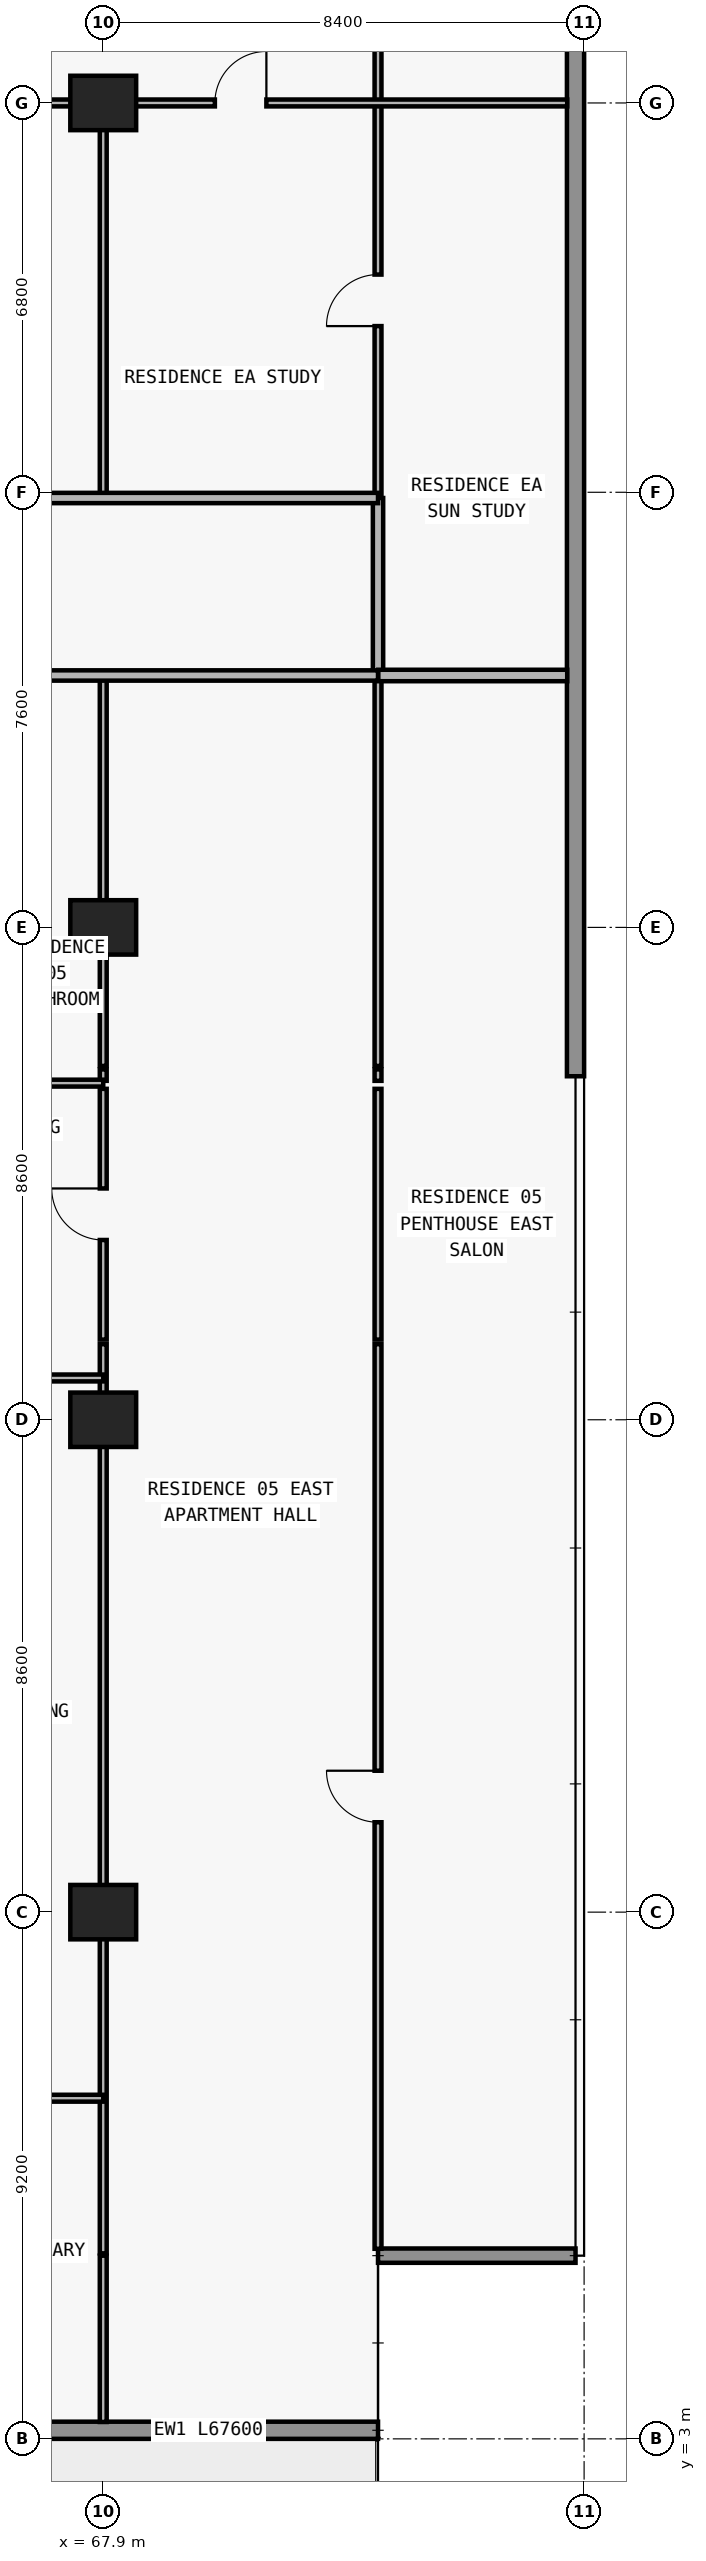
"""IFC4 building model, lengths in metres.
Left out: names, types, materials, properties, quantities, classifications, styles, units other than length and angle.
Written with IfcOpenShell. Run it as: python <this file> out.ifc"""

import sys

from ifc_helpers import new_model, si_unit, direction, frame, frame_2d, origin, origin_2d, place, context, subcontext, project, spatial, rectangle, extrude, element, fill, save


model = new_model("IFC4")
c1 = context("Model", 3, precision=1e-05, world=origin(), true_north=direction((0.0, 1.0)))
c2 = subcontext(c1, "Body", "Model", "MODEL_VIEW")
j1 = project(units=[si_unit("LENGTHUNIT", "METRE"), si_unit("PLANEANGLEUNIT", "RADIAN")], contexts=[c1])
p1 = place(None, origin())
s1 = spatial("IfcSite", under=j1, at=p1, CompositionType="ELEMENT")
p2 = place(p1, origin())
s2 = spatial("IfcBuilding", under=s1, at=p2, CompositionType="ELEMENT")
p3 = place(p2, frame((0.0, 0.0, 59.7)))
s3 = spatial("IfcBuildingStorey", under=s2, at=p3, CompositionType="ELEMENT", Elevation=59.7)
for number, where, z_axis, x_axis in (
    (1, (67.9, 12.2, 0.0), (0.0, 0.0, 1.0), (1.0, 0.0, 0.0)),
    (2, (67.9, 20.8, 0.0), (0.0, 0.0, 1.0), (1.0, 0.0, 0.0)),
    (3, (67.9, 29.4, 0.0), (0.0, 0.0, 1.0), (1.0, 0.0, 0.0)),
    (4, (67.9, 43.8, 0.0), (0.0, 0.0, 1.0), (1.0, 0.0, 0.0)),
):
    element("IfcColumn", number, at=place(p3, frame(where, z_axis=z_axis, x_axis=x_axis)), inside=s3, PredefinedType="COLUMN", context=c2, shape_type="SweptSolid", body=[
        extrude(rectangle(XDim=1.15, YDim=0.95, at=origin_2d()), origin(), (0.0, 0.0, 1.0), 3.05),
    ])
p4 = place(p3, frame((72.7, 3.15, 0.0), z_axis=(0.0, 0.0, 1.0), x_axis=(-1.0, 0.0, 0.0)))
e5 = element("IfcWall", 5, at=p4, inside=s3, PredefinedType="STANDARD", context=c2, shape_type="SweptSolid", body=[
    extrude(rectangle(XDim=67.6, YDim=0.3, at=frame_2d((33.8, 0.0))), origin(), (0.0, 0.0, 1.0), 3.05),
])
p5 = place(p4, frame((59.89, 0.0, 0.0)))
e6 = element("IfcOpeningElement", 6, at=p5, cuts=e5, PredefinedType="OPENING", context=c2, shape_type="SweptSolid", body=[
    extrude(rectangle(XDim=2.0, YDim=2.3, at=frame_2d((1.0, 1.15))), frame((0.0, 0.16, 0.0), z_axis=(0.0, -1.0, 0.0), x_axis=(1.0, 0.0, 0.0)), (0.0, 0.0, 1.0), 0.32),
])
p6 = place(p4, frame((55.21, 0.0, 0.65)))
e7 = element("IfcOpeningElement", 7, at=p6, cuts=e5, PredefinedType="OPENING", context=c2, shape_type="SweptSolid", body=[
    extrude(rectangle(XDim=2.6, YDim=1.85, at=frame_2d((1.3, 0.925))), frame((0.0, 0.16, 0.0), z_axis=(0.0, -1.0, 0.0), x_axis=(1.0, 0.0, 0.0)), (0.0, 0.0, 1.0), 0.32),
])
p7 = place(p4, frame((49.1, 0.0, 0.85)))
e8 = element("IfcOpeningElement", 8, at=p7, cuts=e5, PredefinedType="OPENING", context=c2, shape_type="SweptSolid", body=[
    extrude(rectangle(XDim=2.2, YDim=1.55, at=frame_2d((1.1, 0.775))), frame((0.0, 0.16, 0.0), z_axis=(0.0, -1.0, 0.0), x_axis=(1.0, 0.0, 0.0)), (0.0, 0.0, 1.0), 0.32),
])
p8 = place(p4, frame((43.09, 0.0, 0.0)))
e9 = element("IfcOpeningElement", 9, at=p8, cuts=e5, PredefinedType="OPENING", context=c2, shape_type="SweptSolid", body=[
    extrude(rectangle(XDim=2.0, YDim=2.3, at=frame_2d((1.0, 1.15))), frame((0.0, 0.16, 0.0), z_axis=(0.0, -1.0, 0.0), x_axis=(1.0, 0.0, 0.0)), (0.0, 0.0, 1.0), 0.32),
])
p9 = place(p4, frame((38.41, 0.0, 0.65)))
e10 = element("IfcOpeningElement", 10, at=p9, cuts=e5, PredefinedType="OPENING", context=c2, shape_type="SweptSolid", body=[
    extrude(rectangle(XDim=2.6, YDim=1.85, at=frame_2d((1.3, 0.925))), frame((0.0, 0.16, 0.0), z_axis=(0.0, -1.0, 0.0), x_axis=(1.0, 0.0, 0.0)), (0.0, 0.0, 1.0), 0.32),
])
p10 = place(p4, frame((32.7, 0.0, 0.85)))
e11 = element("IfcOpeningElement", 11, at=p10, cuts=e5, PredefinedType="OPENING", context=c2, shape_type="SweptSolid", body=[
    extrude(rectangle(XDim=2.2, YDim=1.55, at=frame_2d((1.1, 0.775))), frame((0.0, 0.16, 0.0), z_axis=(0.0, -1.0, 0.0), x_axis=(1.0, 0.0, 0.0)), (0.0, 0.0, 1.0), 0.32),
])
p11 = place(p4, frame((27.026, 0.0, 0.0)))
e12 = element("IfcOpeningElement", 12, at=p11, cuts=e5, PredefinedType="OPENING", context=c2, shape_type="SweptSolid", body=[
    extrude(rectangle(XDim=2.0, YDim=2.3, at=frame_2d((1.0, 1.15))), frame((0.0, 0.16, 0.0), z_axis=(0.0, -1.0, 0.0), x_axis=(1.0, 0.0, 0.0)), (0.0, 0.0, 1.0), 0.32),
])
p12 = place(p4, frame((22.726, 0.0, 0.85)))
e13 = element("IfcOpeningElement", 13, at=p12, cuts=e5, PredefinedType="OPENING", context=c2, shape_type="SweptSolid", body=[
    extrude(rectangle(XDim=2.2, YDim=1.55, at=frame_2d((1.1, 0.775))), frame((0.0, 0.16, 0.0), z_axis=(0.0, -1.0, 0.0), x_axis=(1.0, 0.0, 0.0)), (0.0, 0.0, 1.0), 0.32),
])
p13 = place(p4, frame((18.29, 0.0, 0.0)))
e14 = element("IfcOpeningElement", 14, at=p13, cuts=e5, PredefinedType="OPENING", context=c2, shape_type="SweptSolid", body=[
    extrude(rectangle(XDim=2.0, YDim=2.3, at=frame_2d((1.0, 1.15))), frame((0.0, 0.16, 0.0), z_axis=(0.0, -1.0, 0.0), x_axis=(1.0, 0.0, 0.0)), (0.0, 0.0, 1.0), 0.32),
])
p14 = place(p4, frame((14.19, 0.0, 0.85)))
e15 = element("IfcOpeningElement", 15, at=p14, cuts=e5, PredefinedType="OPENING", context=c2, shape_type="SweptSolid", body=[
    extrude(rectangle(XDim=1.8, YDim=1.55, at=frame_2d((0.9, 0.775))), frame((0.0, 0.16, 0.0), z_axis=(0.0, -1.0, 0.0), x_axis=(1.0, 0.0, 0.0)), (0.0, 0.0, 1.0), 0.32),
])
p15 = place(p4, frame((10.226, 0.0, 0.0)))
e16 = element("IfcOpeningElement", 16, at=p15, cuts=e5, PredefinedType="OPENING", context=c2, shape_type="SweptSolid", body=[
    extrude(rectangle(XDim=2.0, YDim=2.3, at=frame_2d((1.0, 1.15))), frame((0.0, 0.16, 0.0), z_axis=(0.0, -1.0, 0.0), x_axis=(1.0, 0.0, 0.0)), (0.0, 0.0, 1.0), 0.32),
])
p16 = place(p4, frame((5.926, 0.0, 0.85)))
e17 = element("IfcOpeningElement", 17, at=p16, cuts=e5, PredefinedType="OPENING", context=c2, shape_type="SweptSolid", body=[
    extrude(rectangle(XDim=2.2, YDim=1.55, at=frame_2d((1.1, 0.775))), frame((0.0, 0.16, 0.0), z_axis=(0.0, -1.0, 0.0), x_axis=(1.0, 0.0, 0.0)), (0.0, 0.0, 1.0), 0.32),
])
p17 = place(p3, frame((72.7, 6.2, 0.0), z_axis=(0.0, 0.0, 1.0), x_axis=(1.0, 0.0, 0.0)))
e18 = element("IfcWall", 18, at=p17, inside=s3, PredefinedType="ELEMENTEDWALL", context=c2, shape_type="SweptSolid", body=[
    extrude(rectangle(XDim=3.45, YDim=0.25, at=frame_2d((1.725, 0.0))), origin(), (0.0, 0.0, 1.0), 3.05),
])
p18 = place(p3, frame((76.15, 47.4, 0.0), z_axis=(0.0, 0.0, 1.0), x_axis=(0.0, -1.0, 0.0)))
e19 = element("IfcWall", 19, at=p18, inside=s3, PredefinedType="STANDARD", context=c2, shape_type="SweptSolid", body=[
    extrude(rectangle(XDim=20.6, YDim=0.3, at=frame_2d((10.3, 0.0))), origin(), (0.0, 0.0, 1.0), 3.05),
])
p19 = place(p3, frame((67.9, 3.295, 0.0), z_axis=(0.0, 0.0, 1.0), x_axis=(0.0, 1.0, 0.0)))
e20 = element("IfcWall", 20, at=p19, inside=s3, PredefinedType="PARTITIONING", context=c2, shape_type="SweptSolid", body=[
    extrude(rectangle(XDim=2.905, YDim=0.12, at=frame_2d((1.453, 0.0))), origin(), (0.0, 0.0, 1.0), 3.05),
])
p20 = place(p3, frame((67.9, 6.24, 0.0), z_axis=(0.0, 0.0, 1.0), x_axis=(0.0, 1.0, 0.0)))
e21 = element("IfcWall", 21, at=p20, inside=s3, PredefinedType="PARTITIONING", context=c2, shape_type="SweptSolid", body=[
    extrude(rectangle(XDim=15.88, YDim=0.12, at=frame_2d((7.94, 0.0))), origin(), (0.0, 0.0, 1.0), 2.11),
])
p21 = place(p3, frame((67.9, 22.2, 0.0), z_axis=(0.0, 0.0, 1.0), x_axis=(0.0, 1.0, 0.0)))
e22 = element("IfcWall", 22, at=p21, inside=s3, PredefinedType="PARTITIONING", context=c2, shape_type="SweptSolid", body=[
    extrude(rectangle(XDim=4.38, YDim=0.12, at=frame_2d((2.19, 0.0))), origin(), (0.0, 0.0, 1.0), 2.11),
])
p22 = place(p21, frame((1.74, 0.0, 0.0)))
e23 = element("IfcOpeningElement", 23, at=p22, cuts=e22, PredefinedType="OPENING", context=c2, shape_type="SweptSolid", body=[
    extrude(rectangle(XDim=0.9, YDim=2.06, at=frame_2d((0.45, 1.03))), frame((0.0, 0.07, 0.0), z_axis=(0.0, -1.0, 0.0), x_axis=(1.0, 0.0, 0.0)), (0.0, 0.0, 1.0), 0.14),
])
p23 = place(p3, frame((67.9, 26.72, 0.0), z_axis=(0.0, 0.0, 1.0), x_axis=(0.0, 1.0, 0.0)))
e24 = element("IfcWall", 24, at=p23, inside=s3, PredefinedType="PARTITIONING", context=c2, shape_type="SweptSolid", body=[
    extrude(rectangle(XDim=0.2, YDim=0.12, at=frame_2d((0.1, 0.0))), origin(), (0.0, 0.0, 1.0), 2.11),
])
p24 = place(p3, frame((67.9, 26.98, 0.0), z_axis=(0.0, 0.0, 1.0), x_axis=(0.0, 1.0, 0.0)))
e25 = element("IfcWall", 25, at=p24, inside=s3, PredefinedType="PARTITIONING", context=c2, shape_type="SweptSolid", body=[
    extrude(rectangle(XDim=6.82, YDim=0.12, at=frame_2d((3.41, 0.0))), origin(), (0.0, 0.0, 1.0), 2.11),
])
p25 = place(p3, frame((67.9, 36.9, 0.0), z_axis=(0.0, 0.0, 1.0), x_axis=(0.0, 1.0, 0.0)))
e26 = element("IfcWall", 26, at=p25, inside=s3, PredefinedType="PARTITIONING", context=c2, shape_type="SweptSolid", body=[
    extrude(rectangle(XDim=6.9, YDim=0.12, at=frame_2d((3.45, 0.0))), origin(), (0.0, 0.0, 1.0), 2.11),
])
p26 = place(p3, frame((72.7, 6.32, 0.0), z_axis=(0.0, 0.0, 1.0), x_axis=(0.0, 1.0, 0.0)))
e27 = element("IfcWall", 27, at=p26, inside=s3, PredefinedType="PARTITIONING", context=c2, shape_type="SweptSolid", body=[
    extrude(rectangle(XDim=15.8, YDim=0.12, at=frame_2d((7.9, 0.0))), origin(), (0.0, 0.0, 1.0), 3.05),
])
p27 = place(p26, frame((7.45, 0.0, 0.0)))
e28 = element("IfcOpeningElement", 28, at=p27, cuts=e27, PredefinedType="OPENING", context=c2, shape_type="SweptSolid", body=[
    extrude(rectangle(XDim=0.9, YDim=2.15, at=frame_2d((0.45, 1.075))), frame((0.0, 0.07, 0.0), z_axis=(0.0, -1.0, 0.0), x_axis=(1.0, 0.0, 0.0)), (0.0, 0.0, 1.0), 0.14),
])
p28 = place(p3, frame((72.7, 22.2, 0.0), z_axis=(0.0, 0.0, 1.0), x_axis=(0.0, 1.0, 0.0)))
e29 = element("IfcWall", 29, at=p28, inside=s3, PredefinedType="PARTITIONING", context=c2, shape_type="SweptSolid", body=[
    extrude(rectangle(XDim=4.38, YDim=0.12, at=frame_2d((2.19, 0.0))), origin(), (0.0, 0.0, 1.0), 3.05),
])
p29 = place(p3, frame((72.7, 26.72, 0.0), z_axis=(0.0, 0.0, 1.0), x_axis=(0.0, 1.0, 0.0)))
e30 = element("IfcWall", 30, at=p29, inside=s3, PredefinedType="PARTITIONING", context=c2, shape_type="SweptSolid", body=[
    extrude(rectangle(XDim=0.2, YDim=0.12, at=frame_2d((0.1, 0.0))), origin(), (0.0, 0.0, 1.0), 3.05),
])
p30 = place(p3, frame((72.7, 26.98, 0.0), z_axis=(0.0, 0.0, 1.0), x_axis=(0.0, 1.0, 0.0)))
e31 = element("IfcWall", 31, at=p30, inside=s3, PredefinedType="PARTITIONING", context=c2, shape_type="SweptSolid", body=[
    extrude(rectangle(XDim=6.82, YDim=0.12, at=frame_2d((3.41, 0.0))), origin(), (0.0, 0.0, 1.0), 3.05),
])
p31 = place(p3, frame((72.7, 33.805, 0.0), z_axis=(0.0, 0.0, 1.0), x_axis=(0.0, 1.0, 0.0)))
e32 = element("IfcWall", 32, at=p31, inside=s3, PredefinedType="PARTITIONING", context=c2, shape_type="SweptSolid", body=[
    extrude(rectangle(XDim=3.095, YDim=0.18, at=frame_2d((1.547, 0.0))), origin(), (0.0, 0.0, 1.0), 3.05),
])
p32 = place(p3, frame((72.7, 36.905, 0.0), z_axis=(0.0, 0.0, 1.0), x_axis=(0.0, 1.0, 0.0)))
e33 = element("IfcWall", 33, at=p32, inside=s3, PredefinedType="PARTITIONING", context=c2, shape_type="SweptSolid", body=[
    extrude(rectangle(XDim=10.375, YDim=0.12, at=frame_2d((5.188, 0.0))), origin(), (0.0, 0.0, 1.0), 3.05),
])
p33 = place(p32, frame((2.998, 0.0, 0.0)))
e34 = element("IfcOpeningElement", 34, at=p33, cuts=e33, PredefinedType="OPENING", context=c2, shape_type="SweptSolid", body=[
    extrude(rectangle(XDim=0.9, YDim=2.15, at=frame_2d((0.45, 1.075))), frame((0.0, 0.07, 0.0), z_axis=(0.0, -1.0, 0.0), x_axis=(1.0, 0.0, 0.0)), (0.0, 0.0, 1.0), 0.14),
])
p34 = place(p32, frame((8.185, 0.0, 0.0)))
e35 = element("IfcOpeningElement", 35, at=p34, cuts=e33, PredefinedType="OPENING", context=c2, shape_type="SweptSolid", body=[
    extrude(rectangle(XDim=0.9, YDim=2.15, at=frame_2d((0.45, 1.075))), frame((0.0, 0.07, 0.0), z_axis=(0.0, -1.0, 0.0), x_axis=(1.0, 0.0, 0.0)), (0.0, 0.0, 1.0), 0.14),
])
p35 = place(p3, frame((63.448, 8.95, 0.0), z_axis=(0.0, 0.0, 1.0), x_axis=(1.0, 0.0, 0.0)))
e36 = element("IfcWall", 36, at=p35, inside=s3, PredefinedType="PARTITIONING", context=c2, shape_type="SweptSolid", body=[
    extrude(rectangle(XDim=4.452, YDim=0.12, at=frame_2d((2.226, 0.0))), origin(), (0.0, 0.0, 1.0), 3.05),
])
p36 = place(p35, frame((1.776, 0.0, 0.0)))
e37 = element("IfcOpeningElement", 37, at=p36, cuts=e36, PredefinedType="OPENING", context=c2, shape_type="SweptSolid", body=[
    extrude(rectangle(XDim=0.9, YDim=2.15, at=frame_2d((0.45, 1.075))), frame((0.0, 0.07, 0.0), z_axis=(0.0, -1.0, 0.0), x_axis=(1.0, 0.0, 0.0)), (0.0, 0.0, 1.0), 0.14),
])
p37 = place(p3, frame((59.5, 21.53, 0.0), z_axis=(0.0, 0.0, 1.0), x_axis=(1.0, 0.0, 0.0)))
e38 = element("IfcWall", 38, at=p37, inside=s3, PredefinedType="PARTITIONING", context=c2, shape_type="SweptSolid", body=[
    extrude(rectangle(XDim=8.4, YDim=0.12, at=frame_2d((4.2, 0.0))), origin(), (0.0, 0.0, 1.0), 3.05),
])
p38 = place(p37, frame((1.524, 0.0, 0.0)))
e39 = element("IfcOpeningElement", 39, at=p38, cuts=e38, PredefinedType="OPENING", context=c2, shape_type="SweptSolid", body=[
    extrude(rectangle(XDim=0.9, YDim=2.15, at=frame_2d((0.45, 1.075))), frame((0.0, 0.07, 0.0), z_axis=(0.0, -1.0, 0.0), x_axis=(1.0, 0.0, 0.0)), (0.0, 0.0, 1.0), 0.14),
])
p39 = place(p37, frame((6.143, 0.0, 0.0)))
e40 = element("IfcOpeningElement", 40, at=p39, cuts=e38, PredefinedType="OPENING", context=c2, shape_type="SweptSolid", body=[
    extrude(rectangle(XDim=0.9, YDim=2.15, at=frame_2d((0.45, 1.075))), frame((0.0, 0.07, 0.0), z_axis=(0.0, -1.0, 0.0), x_axis=(1.0, 0.0, 0.0)), (0.0, 0.0, 1.0), 0.14),
])
p40 = place(p3, frame((59.5, 26.68, 0.0), z_axis=(0.0, 0.0, 1.0), x_axis=(1.0, 0.0, 0.0)))
e41 = element("IfcWall", 41, at=p40, inside=s3, PredefinedType="PARTITIONING", context=c2, shape_type="SweptSolid", body=[
    extrude(rectangle(XDim=8.4, YDim=0.12, at=frame_2d((4.2, 0.0))), origin(), (0.0, 0.0, 1.0), 3.05),
])
p41 = place(p40, frame((1.943, 0.0, 0.0)))
e42 = element("IfcOpeningElement", 42, at=p41, cuts=e41, PredefinedType="OPENING", context=c2, shape_type="SweptSolid", body=[
    extrude(rectangle(XDim=0.9, YDim=2.15, at=frame_2d((0.45, 1.075))), frame((0.0, 0.07, 0.0), z_axis=(0.0, -1.0, 0.0), x_axis=(1.0, 0.0, 0.0)), (0.0, 0.0, 1.0), 0.14),
])
p42 = place(p3, frame((5.105, 33.8, 0.0), z_axis=(0.0, 0.0, 1.0), x_axis=(1.0, 0.0, 0.0)))
e43 = element("IfcWall", 43, at=p42, inside=s3, PredefinedType="PARTITIONING", context=c2, shape_type="SweptSolid", body=[
    extrude(rectangle(XDim=67.595, YDim=0.18, at=frame_2d((33.797, 0.0))), origin(), (0.0, 0.0, 1.0), 3.05),
])
p43 = place(p42, frame((7.745, 0.0, 0.0)))
e44 = element("IfcOpeningElement", 44, at=p43, cuts=e43, PredefinedType="OPENING", context=c2, shape_type="SweptSolid", body=[
    extrude(rectangle(XDim=1.0, YDim=2.2, at=frame_2d((0.5, 1.1))), frame((0.0, 0.1, 0.0), z_axis=(0.0, -1.0, 0.0), x_axis=(1.0, 0.0, 0.0)), (0.0, 0.0, 1.0), 0.2),
])
p44 = place(p42, frame((24.545, 0.0, 0.0)))
e45 = element("IfcOpeningElement", 45, at=p44, cuts=e43, PredefinedType="OPENING", context=c2, shape_type="SweptSolid", body=[
    extrude(rectangle(XDim=1.0, YDim=2.2, at=frame_2d((0.5, 1.1))), frame((0.0, 0.1, 0.0), z_axis=(0.0, -1.0, 0.0), x_axis=(1.0, 0.0, 0.0)), (0.0, 0.0, 1.0), 0.2),
])
p45 = place(p42, frame((40.47, 0.0, 0.0)))
e46 = element("IfcOpeningElement", 46, at=p45, cuts=e43, PredefinedType="OPENING", context=c2, shape_type="SweptSolid", body=[
    extrude(rectangle(XDim=1.0, YDim=2.2, at=frame_2d((0.5, 1.1))), frame((0.0, 0.1, 0.0), z_axis=(0.0, -1.0, 0.0), x_axis=(1.0, 0.0, 0.0)), (0.0, 0.0, 1.0), 0.2),
])
p46 = place(p42, frame((48.87, 0.0, 0.0)))
e47 = element("IfcOpeningElement", 47, at=p46, cuts=e43, PredefinedType="OPENING", context=c2, shape_type="SweptSolid", body=[
    extrude(rectangle(XDim=1.0, YDim=2.2, at=frame_2d((0.5, 1.1))), frame((0.0, 0.1, 0.0), z_axis=(0.0, -1.0, 0.0), x_axis=(1.0, 0.0, 0.0)), (0.0, 0.0, 1.0), 0.2),
])
p47 = place(p42, frame((57.27, 0.0, 0.0)))
e48 = element("IfcOpeningElement", 48, at=p47, cuts=e43, PredefinedType="OPENING", context=c2, shape_type="SweptSolid", body=[
    extrude(rectangle(XDim=1.0, YDim=2.2, at=frame_2d((0.5, 1.1))), frame((0.0, 0.1, 0.0), z_axis=(0.0, -1.0, 0.0), x_axis=(1.0, 0.0, 0.0)), (0.0, 0.0, 1.0), 0.2),
])
p48 = place(p3, frame((72.705, 33.8, 0.0), z_axis=(0.0, 0.0, 1.0), x_axis=(1.0, 0.0, 0.0)))
e49 = element("IfcWall", 49, at=p48, inside=s3, PredefinedType="PARTITIONING", context=c2, shape_type="SweptSolid", body=[
    extrude(rectangle(XDim=3.3, YDim=0.2, at=frame_2d((1.65, 0.0))), origin(), (0.0, 0.0, 1.0), 3.05),
])
p49 = place(p3, frame((60.055, 36.9, 0.0), z_axis=(0.0, 0.0, 1.0), x_axis=(1.0, 0.0, 0.0)))
e50 = element("IfcWall", 50, at=p49, inside=s3, PredefinedType="PARTITIONING", context=c2, shape_type="SweptSolid", body=[
    extrude(rectangle(XDim=12.645, YDim=0.18, at=frame_2d((6.323, 0.0))), origin(), (0.0, 0.0, 1.0), 3.05),
])
p50 = place(p49, frame((4.52, 0.0, 0.0)))
e51 = element("IfcOpeningElement", 51, at=p50, cuts=e50, PredefinedType="OPENING", context=c2, shape_type="SweptSolid", body=[
    extrude(rectangle(XDim=1.0, YDim=2.2, at=frame_2d((0.5, 1.1))), frame((0.0, 0.1, 0.0), z_axis=(0.0, -1.0, 0.0), x_axis=(1.0, 0.0, 0.0)), (0.0, 0.0, 1.0), 0.2),
])
p51 = place(p3, frame((60.045, 43.8, 0.0), z_axis=(0.0, 0.0, 1.0), x_axis=(1.0, 0.0, 0.0)))
e52 = element("IfcWall", 52, at=p51, inside=s3, PredefinedType="PARTITIONING", context=c2, shape_type="SweptSolid", body=[
    extrude(rectangle(XDim=15.96, YDim=0.12, at=frame_2d((7.98, 0.0))), origin(), (0.0, 0.0, 1.0), 2.339),
])
p52 = place(p51, frame((9.805, 0.0, 0.0)))
e53 = element("IfcOpeningElement", 53, at=p52, cuts=e52, PredefinedType="OPENING", context=c2, shape_type="SweptSolid", body=[
    extrude(rectangle(XDim=0.9, YDim=2.15, at=frame_2d((0.45, 1.075))), frame((0.0, 0.07, 0.0), z_axis=(0.0, -1.0, 0.0), x_axis=(1.0, 0.0, 0.0)), (0.0, 0.0, 1.0), 0.14),
])
p53 = place(p51, frame((4.58, 0.0, 0.0)))
e54 = element("IfcOpeningElement", 54, at=p53, cuts=e52, PredefinedType="OPENING", context=c2, shape_type="SweptSolid", body=[
    extrude(rectangle(XDim=0.9, YDim=2.15, at=frame_2d((0.45, 1.075))), frame((0.0, 0.07, 0.0), z_axis=(0.0, -1.0, 0.0), x_axis=(1.0, 0.0, 0.0)), (0.0, 0.0, 1.0), 0.14),
])
p54 = place(p51, frame((0.677, 0.0, 0.0)))
e55 = element("IfcOpeningElement", 55, at=p54, cuts=e52, PredefinedType="OPENING", context=c2, shape_type="SweptSolid", body=[
    extrude(rectangle(XDim=0.85, YDim=2.1, at=frame_2d((0.425, 1.05))), frame((0.0, 0.07, 0.0), z_axis=(0.0, -1.0, 0.0), x_axis=(1.0, 0.0, 0.0)), (0.0, 0.0, 1.0), 0.14),
])
p55 = place(p22, origin())
e56 = element("IfcDoor", 56, at=p55, inside=s3, OperationType="SINGLE_SWING_RIGHT", PredefinedType="DOOR", context=c2, shape_type="SweptSolid", body=[
    extrude(rectangle(XDim=0.9, YDim=2.06, at=frame_2d((0.45, 1.03))), frame((0.0, 0.025, 0.0), z_axis=(0.0, -1.0, 0.0), x_axis=(1.0, 0.0, 0.0)), (0.0, 0.0, 1.0), 0.05),
])
fill(e23, e56)
p56 = place(p27, origin())
e57 = element("IfcDoor", 57, at=p56, inside=s3, OperationType="SINGLE_SWING_RIGHT", PredefinedType="DOOR", context=c2, shape_type="SweptSolid", body=[
    extrude(rectangle(XDim=0.9, YDim=2.15, at=frame_2d((0.45, 1.075))), frame((0.0, 0.025, 0.0), z_axis=(0.0, -1.0, 0.0), x_axis=(1.0, 0.0, 0.0)), (0.0, 0.0, 1.0), 0.05),
])
fill(e28, e57)
p57 = place(p52, origin())
e58 = element("IfcDoor", 58, at=p57, inside=s3, OperationType="SINGLE_SWING_RIGHT", PredefinedType="DOOR", context=c2, shape_type="SweptSolid", body=[
    extrude(rectangle(XDim=0.9, YDim=2.15, at=frame_2d((0.45, 1.075))), frame((0.0, 0.025, 0.0), z_axis=(0.0, -1.0, 0.0), x_axis=(1.0, 0.0, 0.0)), (0.0, 0.0, 1.0), 0.05),
])
fill(e53, e58)
p58 = place(p33, origin())
e59 = element("IfcDoor", 59, at=p58, inside=s3, OperationType="SINGLE_SWING_LEFT", PredefinedType="DOOR", context=c2, shape_type="SweptSolid", body=[
    extrude(rectangle(XDim=0.9, YDim=2.15, at=frame_2d((0.45, 1.075))), frame((0.0, 0.025, 0.0), z_axis=(0.0, -1.0, 0.0), x_axis=(1.0, 0.0, 0.0)), (0.0, 0.0, 1.0), 0.05),
])
fill(e34, e59)
save(model, sys.argv[1])
